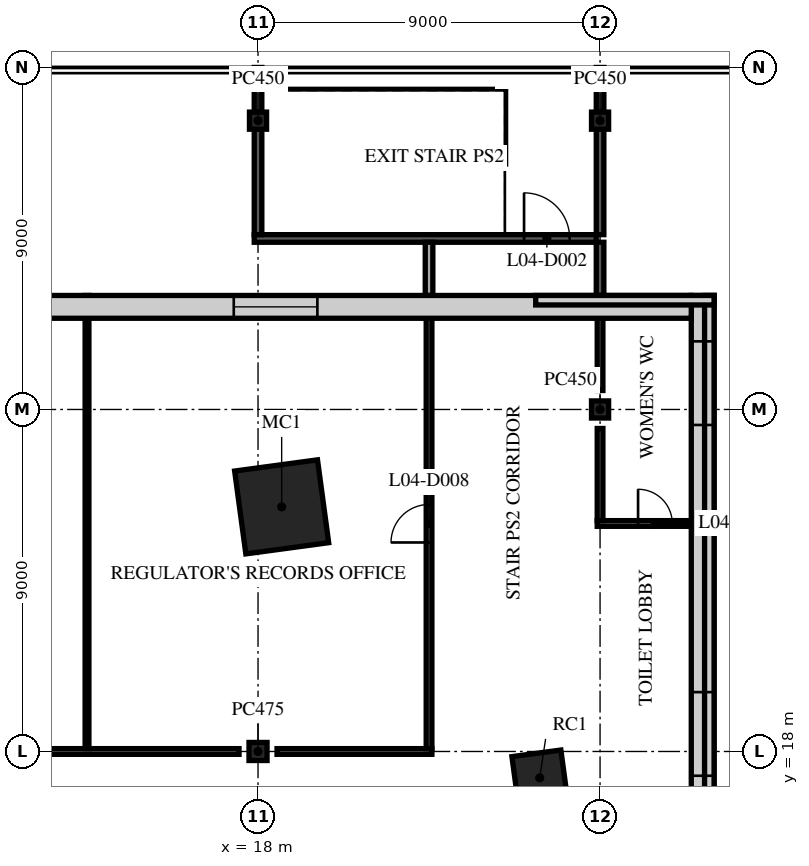
"""IFC4 building model, lengths in metres.
Left out: names, types, materials, properties, quantities, classifications, styles, units other than length and angle.
Written with IfcOpenShell. Run it as: python <this file> out.ifc"""

import sys

from ifc_helpers import new_model, si_unit, direction, frame, frame_2d, origin, origin_2d, place, context, subcontext, project, spatial, rectangle, extrude, element, fill, save


model = new_model("IFC4")
c1 = context("Model", 3, precision=1e-05, world=origin(), true_north=direction((0.0, 1.0)))
c2 = subcontext(c1, "Body", "Model", "MODEL_VIEW")
j1 = project(units=[si_unit("LENGTHUNIT", "METRE"), si_unit("PLANEANGLEUNIT", "RADIAN")], contexts=[c1])
p1 = place(None, origin())
s1 = spatial("IfcSite", under=j1, at=p1, CompositionType="ELEMENT")
p2 = place(p1, origin())
s2 = spatial("IfcBuilding", under=s1, at=p2, CompositionType="ELEMENT")
p3 = place(p2, frame((0.0, 0.0, 18.0)))
s3 = spatial("IfcBuildingStorey", under=s2, at=p3, CompositionType="ELEMENT", Elevation=18.0)
p4 = place(p3, frame((18.0, 18.0, 0.0), z_axis=(0.0, 0.0, 1.0), x_axis=(1.0, 0.0, 0.0)))
e1 = element("IfcColumn", 1, at=p4, inside=s3, PredefinedType="COLUMN", context=c2, shape_type="SweptSolid", body=[
    extrude(rectangle(XDim=0.475, YDim=0.475, at=origin_2d()), origin(), (0.0, 0.0, 1.0), 4.5),
])
for number, where, z_axis, x_axis in (
    (2, (18.0, 34.6, 0.0), (0.0, 0.0, 1.0), (1.0, 0.0, 0.0)),
    (3, (27.0, 27.0, 0.0), (0.0, 0.0, 1.0), (1.0, 0.0, 0.0)),
    (4, (27.0, 34.6, 0.0), (0.0, 0.0, 1.0), (1.0, 0.0, 0.0)),
):
    element("IfcColumn", number, at=place(p3, frame(where, z_axis=z_axis, x_axis=x_axis)), inside=s3, PredefinedType="COLUMN", context=c2, shape_type="SweptSolid", body=[
        extrude(rectangle(XDim=0.45, YDim=0.45, at=origin_2d()), origin(), (0.0, 0.0, 1.0), 4.5),
    ])
p5 = place(p3, frame((18.622, 24.437, 0.0), z_axis=(0.0, 0.0, 1.0), x_axis=(0.991001197216, 0.133853005627, 0.0)))
e5 = element("IfcColumn", 5, at=p5, inside=s3, PredefinedType="COLUMN", context=c2, shape_type="SweptSolid", body=[
    extrude(rectangle(XDim=2.2, YDim=2.2, at=origin_2d()), origin(), (0.0, 0.0, 1.0), 4.5),
])
p6 = place(p3, frame((25.412, 17.307, 0.0), z_axis=(0.0, 0.0, 1.0), x_axis=(0.991001197216, 0.133853005627, 0.0)))
e6 = element("IfcColumn", 6, at=p6, inside=s3, PredefinedType="COLUMN", context=c2, shape_type="SweptSolid", body=[
    extrude(rectangle(XDim=1.3, YDim=1.3, at=origin_2d()), origin(), (0.0, 0.0, 1.0), 4.5),
])
p7 = place(p3, frame((9.5, 18.0, 0.0), z_axis=(0.0, 0.0, 1.0), x_axis=(1.0, 0.0, 0.0)))
e7 = element("IfcWall", 7, at=p7, inside=s3, PredefinedType="PARTITIONING", context=c2, shape_type="SweptSolid", body=[
    extrude(rectangle(XDim=8.0, YDim=0.15, at=frame_2d((4.0, 0.0))), origin(), (0.0, 0.0, 1.0), 3.53),
])
p8 = place(p3, frame((18.5, 18.0, 0.0), z_axis=(0.0, 0.0, 1.0), x_axis=(1.0, 0.0, 0.0)))
e8 = element("IfcWall", 8, at=p8, inside=s3, PredefinedType="PARTITIONING", context=c2, shape_type="SweptSolid", body=[
    extrude(rectangle(XDim=4.075, YDim=0.15, at=frame_2d((2.038, 0.0))), origin(), (0.0, 0.0, 1.0), 3.53),
])
p9 = place(p3, frame((26.925, 24.0, 0.0), z_axis=(0.0, 0.0, 1.0), x_axis=(1.0, 0.0, 0.0)))
e9 = element("IfcWall", 9, at=p9, inside=s3, PredefinedType="PARTITIONING", context=c2, shape_type="SweptSolid", body=[
    extrude(rectangle(XDim=3.175, YDim=0.15, at=frame_2d((1.587, 0.0))), origin(), (0.0, 0.0, 1.0), 4.05),
])
p10 = place(p9, frame((1.075, 0.0, 0.0)))
e10 = element("IfcOpeningElement", 10, at=p10, cuts=e9, PredefinedType="OPENING", context=c2, shape_type="SweptSolid", body=[
    extrude(rectangle(XDim=0.9, YDim=2.1, at=frame_2d((0.45, 1.05))), frame((0.0, 0.085, 0.0), z_axis=(0.0, -1.0, 0.0), x_axis=(1.0, 0.0, 0.0)), (0.0, 0.0, 1.0), 0.17),
])
p11 = place(p3, frame((17.9, 31.5, 0.0), z_axis=(0.0, 0.0, 1.0), x_axis=(1.0, 0.0, 0.0)))
e11 = element("IfcWall", 11, at=p11, inside=s3, PredefinedType="PARTITIONING", context=c2, shape_type="SweptSolid", body=[
    extrude(rectangle(XDim=9.0, YDim=0.2, at=frame_2d((4.5, 0.0))), origin(), (0.0, 0.0, 1.0), 4.05),
])
p12 = place(p11, frame((7.1, 0.0, 0.0)))
e12 = element("IfcOpeningElement", 12, at=p12, cuts=e11, PredefinedType="OPENING", context=c2, shape_type="SweptSolid", body=[
    extrude(rectangle(XDim=1.2, YDim=2.1, at=frame_2d((0.6, 1.05))), frame((0.0, 0.11, 0.0), z_axis=(0.0, -1.0, 0.0), x_axis=(1.0, 0.0, 0.0)), (0.0, 0.0, 1.0), 0.22),
])
p13 = place(p3, frame((13.5, 18.075, 0.0), z_axis=(0.0, 0.0, 1.0), x_axis=(0.0, 1.0, 0.0)))
e13 = element("IfcWall", 13, at=p13, inside=s3, PredefinedType="PARTITIONING", context=c2, shape_type="SweptSolid", body=[
    extrude(rectangle(XDim=11.925, YDim=0.1, at=frame_2d((5.962, 0.0))), origin(), (0.0, 0.0, 1.0), 3.23),
])
p14 = place(p3, frame((18.0, 31.6, 0.0), z_axis=(0.0, 0.0, 1.0), x_axis=(0.0, 1.0, 0.0)))
e14 = element("IfcWall", 14, at=p14, inside=s3, PredefinedType="PARTITIONING", context=c2, shape_type="SweptSolid", body=[
    extrude(rectangle(XDim=2.775, YDim=0.2, at=frame_2d((1.387, 0.0))), origin(), (0.0, 0.0, 1.0), 4.05),
])
p15 = place(p3, frame((18.0, 34.825, 0.0), z_axis=(0.0, 0.0, 1.0), x_axis=(0.0, 1.0, 0.0)))
e15 = element("IfcWall", 15, at=p15, inside=s3, PredefinedType="PARTITIONING", context=c2, shape_type="SweptSolid", body=[
    extrude(rectangle(XDim=1.175, YDim=0.2, at=frame_2d((0.587, 0.0))), origin(), (0.0, 0.0, 1.0), 4.05),
])
p16 = place(p3, frame((22.5, 18.075, 0.0), z_axis=(0.0, 0.0, 1.0), x_axis=(0.0, 1.0, 0.0)))
e16 = element("IfcWall", 16, at=p16, inside=s3, PredefinedType="PARTITIONING", context=c2, shape_type="SweptSolid", body=[
    extrude(rectangle(XDim=11.925, YDim=0.15, at=frame_2d((5.962, 0.0))), origin(), (0.0, 0.0, 1.0), 3.23),
])
p17 = place(p16, frame((5.425, 0.0, 0.0)))
e17 = element("IfcOpeningElement", 17, at=p17, cuts=e16, PredefinedType="OPENING", context=c2, shape_type="SweptSolid", body=[
    extrude(rectangle(XDim=1.0, YDim=2.1, at=frame_2d((0.5, 1.05))), frame((0.0, 0.085, 0.0), z_axis=(0.0, -1.0, 0.0), x_axis=(1.0, 0.0, 0.0)), (0.0, 0.0, 1.0), 0.17),
])
p18 = place(p3, frame((22.5, 30.0, 0.0), z_axis=(0.0, 0.0, 1.0), x_axis=(0.0, 1.0, 0.0)))
e18 = element("IfcWall", 18, at=p18, inside=s3, PredefinedType="PARTITIONING", context=c2, shape_type="SweptSolid", body=[
    extrude(rectangle(XDim=1.4, YDim=0.2, at=frame_2d((0.7, 0.0))), origin(), (0.0, 0.0, 1.0), 4.05),
])
p19 = place(p3, frame((27.0, 24.075, 0.0), z_axis=(0.0, 0.0, 1.0), x_axis=(0.0, 1.0, 0.0)))
e19 = element("IfcWall", 19, at=p19, inside=s3, PredefinedType="PARTITIONING", context=c2, shape_type="SweptSolid", body=[
    extrude(rectangle(XDim=2.425, YDim=0.15, at=frame_2d((1.212, 0.0))), origin(), (0.0, 0.0, 1.0), 4.05),
])
p20 = place(p3, frame((27.0, 27.5, 0.0), z_axis=(0.0, 0.0, 1.0), x_axis=(0.0, 1.0, 0.0)))
e20 = element("IfcWall", 20, at=p20, inside=s3, PredefinedType="PARTITIONING", context=c2, shape_type="SweptSolid", body=[
    extrude(rectangle(XDim=2.5, YDim=0.15, at=frame_2d((1.25, 0.0))), origin(), (0.0, 0.0, 1.0), 4.05),
])
p21 = place(p3, frame((27.0, 30.0, 0.0), z_axis=(0.0, 0.0, 1.0), x_axis=(0.0, 1.0, 0.0)))
e21 = element("IfcWall", 21, at=p21, inside=s3, PredefinedType="PARTITIONING", context=c2, shape_type="SweptSolid", body=[
    extrude(rectangle(XDim=1.4, YDim=0.2, at=frame_2d((0.7, 0.0))), origin(), (0.0, 0.0, 1.0), 4.05),
])
p22 = place(p3, frame((27.0, 31.6, 0.0), z_axis=(0.0, 0.0, 1.0), x_axis=(0.0, 1.0, 0.0)))
e22 = element("IfcWall", 22, at=p22, inside=s3, PredefinedType="PARTITIONING", context=c2, shape_type="SweptSolid", body=[
    extrude(rectangle(XDim=2.775, YDim=0.2, at=frame_2d((1.387, 0.0))), origin(), (0.0, 0.0, 1.0), 4.05),
])
p23 = place(p3, frame((27.0, 34.825, 0.0), z_axis=(0.0, 0.0, 1.0), x_axis=(0.0, 1.0, 0.0)))
e23 = element("IfcWall", 23, at=p23, inside=s3, PredefinedType="PARTITIONING", context=c2, shape_type="SweptSolid", body=[
    extrude(rectangle(XDim=1.175, YDim=0.2, at=frame_2d((0.587, 0.0))), origin(), (0.0, 0.0, 1.0), 4.05),
])
p24 = place(p3, frame((29.7, 3.65, 0.0), z_axis=(0.0, 0.0, 1.0), x_axis=(0.0, 1.0, 0.0)))
e24 = element("IfcWall", 24, at=p24, inside=s3, PredefinedType="STANDARD", context=c2, shape_type="SweptSolid", body=[
    extrude(rectangle(XDim=26.35, YDim=0.6, at=frame_2d((13.175, 0.0))), origin(), (0.0, 0.0, 1.0), 4.05),
])
p25 = place(p24, frame((4.481, 0.0, 0.9)))
e25 = element("IfcOpeningElement", 25, at=p25, cuts=e24, PredefinedType="OPENING", context=c2, shape_type="SweptSolid", body=[
    extrude(rectangle(XDim=2.2, YDim=3.0, at=frame_2d((1.1, 1.5))), frame((0.0, 0.31, 0.0), z_axis=(0.0, -1.0, 0.0), x_axis=(1.0, 0.0, 0.0)), (0.0, 0.0, 1.0), 0.62),
])
p26 = place(p24, frame((13.711, 0.0, 0.9)))
e26 = element("IfcOpeningElement", 26, at=p26, cuts=e24, PredefinedType="OPENING", context=c2, shape_type="SweptSolid", body=[
    extrude(rectangle(XDim=2.2, YDim=3.0, at=frame_2d((1.1, 1.5))), frame((0.0, 0.31, 0.0), z_axis=(0.0, -1.0, 0.0), x_axis=(1.0, 0.0, 0.0)), (0.0, 0.0, 1.0), 0.62),
])
p27 = place(p24, frame((22.942, 0.0, 0.9)))
e27 = element("IfcOpeningElement", 27, at=p27, cuts=e24, PredefinedType="OPENING", context=c2, shape_type="SweptSolid", body=[
    extrude(rectangle(XDim=2.2, YDim=3.0, at=frame_2d((1.1, 1.5))), frame((0.0, 0.31, 0.0), z_axis=(0.0, -1.0, 0.0), x_axis=(1.0, 0.0, 0.0)), (0.0, 0.0, 1.0), 0.62),
])
p28 = place(p3, frame((29.4, 29.7, 0.0), z_axis=(0.0, 0.0, 1.0), x_axis=(-1.0, 0.0, 0.0)))
e28 = element("IfcWall", 28, at=p28, inside=s3, PredefinedType="STANDARD", context=c2, shape_type="SweptSolid", body=[
    extrude(rectangle(XDim=22.0, YDim=0.6, at=frame_2d((11.0, 0.0))), origin(), (0.0, 0.0, 1.0), 4.05),
])
p29 = place(p28, frame((9.838, 0.0, 0.9)))
e29 = element("IfcOpeningElement", 29, at=p29, cuts=e28, PredefinedType="OPENING", context=c2, shape_type="SweptSolid", body=[
    extrude(rectangle(XDim=2.2, YDim=3.0, at=frame_2d((1.1, 1.5))), frame((0.0, 0.31, 0.0), z_axis=(0.0, -1.0, 0.0), x_axis=(1.0, 0.0, 0.0)), (0.0, 0.0, 1.0), 0.62),
])
p30 = place(p3, frame((29.875, 7.453, 4.5), z_axis=(0.0, 0.0, 1.0), x_axis=(0.0, 1.0, 0.0)))
e30 = element("IfcWall", 30, at=p30, inside=s3, PredefinedType="PARAPET", context=c2, shape_type="SweptSolid", body=[
    extrude(rectangle(XDim=22.547, YDim=0.25, at=frame_2d((11.273, 0.0))), origin(), (0.0, 0.0, 1.0), 1.1),
])
p31 = place(p3, frame((30.0, 29.875, 4.5), z_axis=(0.0, 0.0, 1.0), x_axis=(-1.0, 0.0, 0.0)))
e31 = element("IfcWall", 31, at=p31, inside=s3, PredefinedType="PARAPET", context=c2, shape_type="SweptSolid", body=[
    extrude(rectangle(XDim=4.694, YDim=0.25, at=frame_2d((2.347, 0.0))), origin(), (0.0, 0.0, 1.0), 1.1),
])
p32 = place(p12, origin())
e32 = element("IfcDoor", 32, at=p32, inside=s3, OperationType="SINGLE_SWING_RIGHT", PredefinedType="DOOR", context=c2, shape_type="SweptSolid", body=[
    extrude(rectangle(XDim=1.2, YDim=2.1, at=frame_2d((0.6, 1.05))), frame((0.0, 0.025, 0.0), z_axis=(0.0, -1.0, 0.0), x_axis=(1.0, 0.0, 0.0)), (0.0, 0.0, 1.0), 0.05),
])
fill(e12, e32)
p33 = place(p10, origin())
e33 = element("IfcDoor", 33, at=p33, inside=s3, OperationType="SINGLE_SWING_LEFT", PredefinedType="DOOR", context=c2, shape_type="SweptSolid", body=[
    extrude(rectangle(XDim=0.9, YDim=2.1, at=frame_2d((0.45, 1.05))), frame((0.0, 0.025, 0.0), z_axis=(0.0, -1.0, 0.0), x_axis=(1.0, 0.0, 0.0)), (0.0, 0.0, 1.0), 0.05),
])
fill(e10, e33)
p34 = place(p17, origin())
e34 = element("IfcDoor", 34, at=p34, inside=s3, OperationType="SINGLE_SWING_RIGHT", PredefinedType="DOOR", context=c2, shape_type="SweptSolid", body=[
    extrude(rectangle(XDim=1.0, YDim=2.1, at=frame_2d((0.5, 1.05))), frame((0.0, 0.025, 0.0), z_axis=(0.0, -1.0, 0.0), x_axis=(1.0, 0.0, 0.0)), (0.0, 0.0, 1.0), 0.05),
])
fill(e17, e34)
p35 = place(p26, origin())
e35 = element("IfcWindow", 35, at=p35, inside=s3, PartitioningType="SINGLE_PANEL", PredefinedType="WINDOW", context=c2, shape_type="SweptSolid", body=[
    extrude(rectangle(XDim=2.2, YDim=3.0, at=frame_2d((1.1, 1.5))), frame((0.0, 0.03, 0.0), z_axis=(0.0, -1.0, 0.0), x_axis=(1.0, 0.0, 0.0)), (0.0, 0.0, 1.0), 0.06),
])
fill(e26, e35)
p36 = place(p27, origin())
e36 = element("IfcWindow", 36, at=p36, inside=s3, PartitioningType="SINGLE_PANEL", PredefinedType="WINDOW", context=c2, shape_type="SweptSolid", body=[
    extrude(rectangle(XDim=2.2, YDim=3.0, at=frame_2d((1.1, 1.5))), frame((0.0, 0.03, 0.0), z_axis=(0.0, -1.0, 0.0), x_axis=(1.0, 0.0, 0.0)), (0.0, 0.0, 1.0), 0.06),
])
fill(e27, e36)
p37 = place(p29, origin())
e37 = element("IfcWindow", 37, at=p37, inside=s3, PartitioningType="SINGLE_PANEL", PredefinedType="WINDOW", context=c2, shape_type="SweptSolid", body=[
    extrude(rectangle(XDim=2.2, YDim=3.0, at=frame_2d((1.1, 1.5))), frame((0.0, 0.03, 0.0), z_axis=(0.0, -1.0, 0.0), x_axis=(1.0, 0.0, 0.0)), (0.0, 0.0, 1.0), 0.06),
])
fill(e29, e37)
save(model, sys.argv[1])
